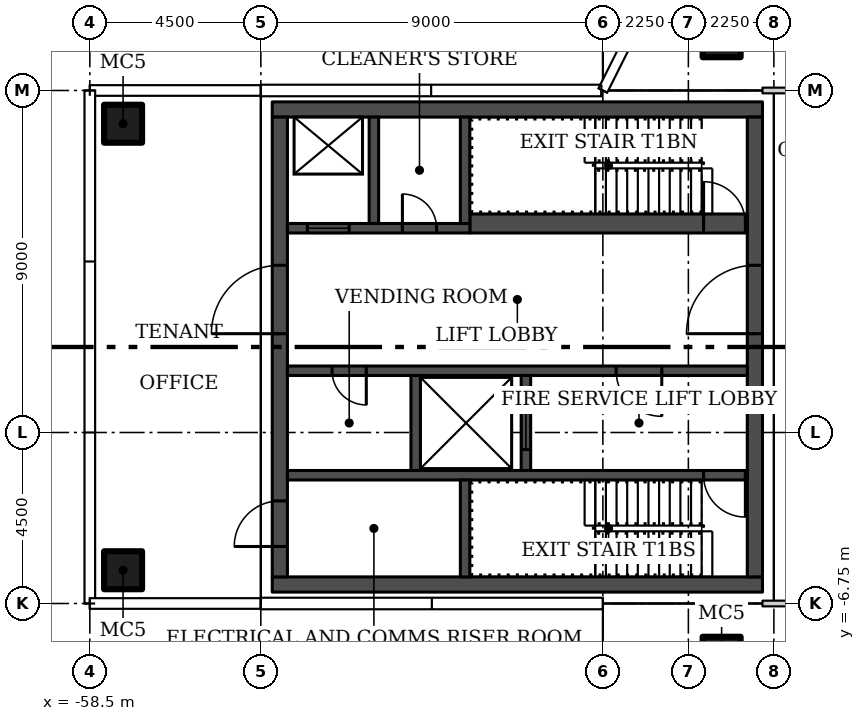
"""IFC4 building model, lengths in metres.
Left out: names, types, materials, properties, quantities, classifications, styles, units other than length and angle.
Written with IfcOpenShell. Run it as: python <this file> out.ifc"""

import sys

from ifc_helpers import new_model, si_unit, direction, frame, frame_2d, origin, origin_2d, place, context, subcontext, project, spatial, rectangle, hollow_rectangle, extrude, element, fill, save


model = new_model("IFC4")
c1 = context("Model", 3, precision=1e-05, world=origin(), true_north=direction((0.0, 1.0)))
c2 = subcontext(c1, "Body", "Model", "MODEL_VIEW")
j1 = project(units=[si_unit("LENGTHUNIT", "METRE"), si_unit("PLANEANGLEUNIT", "RADIAN")], contexts=[c1])
p1 = place(None, origin())
s1 = spatial("IfcSite", under=j1, at=p1, CompositionType="ELEMENT")
p2 = place(p1, origin())
s2 = spatial("IfcBuilding", under=s1, at=p2, CompositionType="ELEMENT")
p3 = place(p2, frame((0.0, 0.0, 217.8)))
s3 = spatial("IfcBuildingStorey", under=s2, at=p3, CompositionType="ELEMENT", Elevation=217.8)
for number, where in (
    (1, (-41.875, 8.125, 0.0)),
    (2, (-41.875, -8.125, 0.0)),
    (3, (-57.625, -5.875, 0.0)),
    (4, (-57.625, 5.875, 0.0)),
):
    element("IfcColumn", number, at=place(p3, frame(where)), inside=s3, PredefinedType="COLUMN", context=c2, shape_type="SweptSolid", body=[
        extrude(hollow_rectangle(XDim=1.0, YDim=1.0, WallThickness=0.04, at=origin_2d()), origin(), (0.0, 0.0, 1.0), 3.55),
    ])
p4 = place(p3, frame((-40.8, 6.75, 0.0)))
e5 = element("IfcWall", 5, at=p4, inside=s3, PredefinedType="PARTITIONING", context=c2, shape_type="SweptSolid", body=[
    extrude(rectangle(XDim=14.1, YDim=0.15, at=frame_2d((7.05, 0.0))), origin(), (0.0, 0.0, 1.0), 3.55),
])
p5 = place(p4, frame((6.3, 0.0, 0.0)))
e6 = element("IfcOpeningElement", 6, at=p5, cuts=e5, PredefinedType="OPENING", context=c2, shape_type="SweptSolid", body=[
    extrude(rectangle(XDim=1.5, YDim=2.1, at=frame_2d((0.75, 1.05))), frame((0.0, 0.085, 0.0), z_axis=(0.0, -1.0, 0.0), x_axis=(1.0, 0.0, 0.0)), (0.0, 0.0, 1.0), 0.17),
])
p6 = place(p3, frame((-26.7, -6.75, 0.0), z_axis=(0.0, 0.0, 1.0), x_axis=(-1.0, 0.0, 0.0)))
e7 = element("IfcWall", 7, at=p6, inside=s3, PredefinedType="PARTITIONING", context=c2, shape_type="SweptSolid", body=[
    extrude(rectangle(XDim=14.1, YDim=0.15, at=frame_2d((7.05, 0.0))), origin(), (0.0, 0.0, 1.0), 3.55),
])
p7 = place(p6, frame((6.3, 0.0, 0.0)))
e8 = element("IfcOpeningElement", 8, at=p7, cuts=e7, PredefinedType="OPENING", context=c2, shape_type="SweptSolid", body=[
    extrude(rectangle(XDim=1.5, YDim=2.1, at=frame_2d((0.75, 1.05))), frame((0.0, 0.085, 0.0), z_axis=(0.0, -1.0, 0.0), x_axis=(1.0, 0.0, 0.0)), (0.0, 0.0, 1.0), 0.17),
])
for number, where, z_axis, x_axis in (
    (9, (-40.8, -6.25, 0.0), (0.0, 0.0, 1.0), (-1.0, 0.0, 0.0)),
    (10, (-40.8, 6.25, 0.0), (0.0, 0.0, 1.0), (-1.0, 0.0, 0.0)),
):
    element("IfcWall", number, at=place(p3, frame(where, z_axis=z_axis, x_axis=x_axis)), inside=s3, PredefinedType="SHEAR", context=c2, shape_type="SweptSolid", body=[
        extrude(rectangle(XDim=12.9, YDim=0.4, at=frame_2d((6.45, 0.0))), origin(), (0.0, 0.0, 1.0), 3.55),
    ])
p8 = place(p3, frame((-41.0, -6.05, 0.0), z_axis=(0.0, 0.0, 1.0), x_axis=(0.0, 1.0, 0.0)))
e11 = element("IfcWall", 11, at=p8, inside=s3, PredefinedType="SHEAR", context=c2, shape_type="SweptSolid", body=[
    extrude(rectangle(XDim=12.1, YDim=0.4, at=frame_2d((6.05, 0.0))), origin(), (0.0, 0.0, 1.0), 3.55),
])
p9 = place(p8, frame((6.4, 0.0, 0.0)))
e12 = element("IfcOpeningElement", 12, at=p9, cuts=e11, PredefinedType="OPENING", context=c2, shape_type="SweptSolid", body=[
    extrude(rectangle(XDim=1.8, YDim=2.4, at=frame_2d((0.9, 1.2))), frame((0.0, 0.21, 0.0), z_axis=(0.0, -1.0, 0.0), x_axis=(1.0, 0.0, 0.0)), (0.0, 0.0, 1.0), 0.42),
])
p10 = place(p3, frame((-53.5, -6.05, 0.0), z_axis=(0.0, 0.0, 1.0), x_axis=(0.0, 1.0, 0.0)))
e13 = element("IfcWall", 13, at=p10, inside=s3, PredefinedType="SHEAR", context=c2, shape_type="SweptSolid", body=[
    extrude(rectangle(XDim=12.1, YDim=0.4, at=frame_2d((6.05, 0.0))), origin(), (0.0, 0.0, 1.0), 3.55),
])
p11 = place(p10, frame((0.8, 0.0, 0.0)))
e14 = element("IfcOpeningElement", 14, at=p11, cuts=e13, PredefinedType="OPENING", context=c2, shape_type="SweptSolid", body=[
    extrude(rectangle(XDim=1.2, YDim=2.1, at=frame_2d((0.6, 1.05))), frame((0.0, 0.21, 0.0), z_axis=(0.0, -1.0, 0.0), x_axis=(1.0, 0.0, 0.0)), (0.0, 0.0, 1.0), 0.42),
])
p12 = place(p10, frame((6.4, 0.0, 0.0)))
e15 = element("IfcOpeningElement", 15, at=p12, cuts=e13, PredefinedType="OPENING", context=c2, shape_type="SweptSolid", body=[
    extrude(rectangle(XDim=1.8, YDim=2.4, at=frame_2d((0.9, 1.2))), frame((0.0, 0.21, 0.0), z_axis=(0.0, -1.0, 0.0), x_axis=(1.0, 0.0, 0.0)), (0.0, 0.0, 1.0), 0.42),
])
p13 = place(p3, frame((-41.2, -3.375, 0.0), z_axis=(0.0, 0.0, 1.0), x_axis=(-1.0, 0.0, 0.0)))
e16 = element("IfcWall", 16, at=p13, inside=s3, PredefinedType="SHEAR", context=c2, shape_type="SweptSolid", body=[
    extrude(rectangle(XDim=12.1, YDim=0.25, at=frame_2d((6.05, 0.0))), origin(), (0.0, 0.0, 1.0), 3.55),
])
p14 = place(p13, frame((0.05, 0.0, 0.0)))
e17 = element("IfcOpeningElement", 17, at=p14, cuts=e16, PredefinedType="OPENING", context=c2, shape_type="SweptSolid", body=[
    extrude(rectangle(XDim=1.1, YDim=2.1, at=frame_2d((0.55, 1.05))), frame((0.0, 0.135, 0.0), z_axis=(0.0, -1.0, 0.0), x_axis=(1.0, 0.0, 0.0)), (0.0, 0.0, 1.0), 0.27),
])
p15 = place(p3, frame((-48.625, -6.05, 0.0), z_axis=(0.0, 0.0, 1.0), x_axis=(0.0, 1.0, 0.0)))
e18 = element("IfcWall", 18, at=p15, inside=s3, PredefinedType="SHEAR", context=c2, shape_type="SweptSolid", body=[
    extrude(rectangle(XDim=2.55, YDim=0.25, at=frame_2d((1.275, 0.0))), origin(), (0.0, 0.0, 1.0), 3.55),
])
p16 = place(p3, frame((-41.2, -0.625, 0.0), z_axis=(0.0, 0.0, 1.0), x_axis=(-1.0, 0.0, 0.0)))
e19 = element("IfcWall", 19, at=p16, inside=s3, PredefinedType="SHEAR", context=c2, shape_type="SweptSolid", body=[
    extrude(rectangle(XDim=12.1, YDim=0.25, at=frame_2d((6.05, 0.0))), origin(), (0.0, 0.0, 1.0), 3.55),
])
p17 = place(p16, frame((2.25, 0.0, 0.0)))
e20 = element("IfcOpeningElement", 20, at=p17, cuts=e19, PredefinedType="OPENING", context=c2, shape_type="SweptSolid", body=[
    extrude(rectangle(XDim=1.2, YDim=2.1, at=frame_2d((0.6, 1.05))), frame((0.0, 0.135, 0.0), z_axis=(0.0, -1.0, 0.0), x_axis=(1.0, 0.0, 0.0)), (0.0, 0.0, 1.0), 0.27),
])
p18 = place(p16, frame((10.025, 0.0, 0.0)))
e21 = element("IfcOpeningElement", 21, at=p18, cuts=e19, PredefinedType="OPENING", context=c2, shape_type="SweptSolid", body=[
    extrude(rectangle(XDim=0.9, YDim=2.1, at=frame_2d((0.45, 1.05))), frame((0.0, 0.135, 0.0), z_axis=(0.0, -1.0, 0.0), x_axis=(1.0, 0.0, 0.0)), (0.0, 0.0, 1.0), 0.27),
])
p19 = place(p3, frame((-47.025, -3.25, 0.0), z_axis=(0.0, 0.0, 1.0), x_axis=(0.0, 1.0, 0.0)))
e22 = element("IfcWall", 22, at=p19, inside=s3, PredefinedType="SHEAR", context=c2, shape_type="SweptSolid", body=[
    extrude(rectangle(XDim=2.5, YDim=0.25, at=frame_2d((1.25, 0.0))), origin(), (0.0, 0.0, 1.0), 3.55),
])
p20 = place(p19, frame((0.55, 0.0, 0.0)))
e23 = element("IfcOpeningElement", 23, at=p20, cuts=e22, PredefinedType="OPENING", context=c2, shape_type="SweptSolid", body=[
    extrude(rectangle(XDim=1.4, YDim=2.4, at=frame_2d((0.7, 1.2))), frame((0.0, 0.135, 0.0), z_axis=(0.0, -1.0, 0.0), x_axis=(1.0, 0.0, 0.0)), (0.0, 0.0, 1.0), 0.27),
])
p21 = place(p3, frame((-49.925, -3.25, 0.0), z_axis=(0.0, 0.0, 1.0), x_axis=(0.0, 1.0, 0.0)))
e24 = element("IfcWall", 24, at=p21, inside=s3, PredefinedType="SHEAR", context=c2, shape_type="SweptSolid", body=[
    extrude(rectangle(XDim=2.5, YDim=0.25, at=frame_2d((1.25, 0.0))), origin(), (0.0, 0.0, 1.0), 3.55),
])
p22 = place(p3, frame((-48.5, 3.25, 0.0)))
e25 = element("IfcWall", 25, at=p22, inside=s3, PredefinedType="SHEAR", context=c2, shape_type="SweptSolid", body=[
    extrude(rectangle(XDim=7.3, YDim=0.5, at=frame_2d((3.65, 0.0))), origin(), (0.0, 0.0, 1.0), 3.55),
])
p23 = place(p22, frame((6.15, 0.0, 0.0)))
e26 = element("IfcOpeningElement", 26, at=p23, cuts=e25, PredefinedType="OPENING", context=c2, shape_type="SweptSolid", body=[
    extrude(rectangle(XDim=1.1, YDim=2.1, at=frame_2d((0.55, 1.05))), frame((0.0, 0.26, 0.0), z_axis=(0.0, -1.0, 0.0), x_axis=(1.0, 0.0, 0.0)), (0.0, 0.0, 1.0), 0.52),
])
p24 = place(p3, frame((-53.3, 3.125, 0.0)))
e27 = element("IfcWall", 27, at=p24, inside=s3, PredefinedType="SHEAR", context=c2, shape_type="SweptSolid", body=[
    extrude(rectangle(XDim=4.8, YDim=0.25, at=frame_2d((2.4, 0.0))), origin(), (0.0, 0.0, 1.0), 3.55),
])
p25 = place(p24, frame((0.525, 0.0, 0.0)))
e28 = element("IfcOpeningElement", 28, at=p25, cuts=e27, PredefinedType="OPENING", context=c2, shape_type="SweptSolid", body=[
    extrude(rectangle(XDim=1.1, YDim=2.1, at=frame_2d((0.55, 1.05))), frame((0.0, 0.135, 0.0), z_axis=(0.0, -1.0, 0.0), x_axis=(1.0, 0.0, 0.0)), (0.0, 0.0, 1.0), 0.27),
])
p26 = place(p24, frame((3.025, 0.0, 0.0)))
e29 = element("IfcOpeningElement", 29, at=p26, cuts=e27, PredefinedType="OPENING", context=c2, shape_type="SweptSolid", body=[
    extrude(rectangle(XDim=0.9, YDim=2.1, at=frame_2d((0.45, 1.05))), frame((0.0, 0.135, 0.0), z_axis=(0.0, -1.0, 0.0), x_axis=(1.0, 0.0, 0.0)), (0.0, 0.0, 1.0), 0.27),
])
for number, where, z_axis, x_axis in (
    (30, (-48.625, 3.25, 0.0), (0.0, 0.0, 1.0), (0.0, 1.0, 0.0)),
    (31, (-51.025, 3.25, 0.0), (0.0, 0.0, 1.0), (0.0, 1.0, 0.0)),
):
    element("IfcWall", number, at=place(p3, frame(where, z_axis=z_axis, x_axis=x_axis)), inside=s3, PredefinedType="SHEAR", context=c2, shape_type="SweptSolid", body=[
        extrude(rectangle(XDim=2.8, YDim=0.25, at=frame_2d((1.4, 0.0))), origin(), (0.0, 0.0, 1.0), 3.55),
    ])
p27 = place(p9, origin())
e32 = element("IfcDoor", 32, at=p27, inside=s3, OperationType="DOUBLE_DOOR_SINGLE_SWING", PredefinedType="DOOR", context=c2, shape_type="SweptSolid", body=[
    extrude(rectangle(XDim=1.8, YDim=2.4, at=frame_2d((0.9, 1.2))), frame((0.0, 0.025, 0.0), z_axis=(0.0, -1.0, 0.0), x_axis=(1.0, 0.0, 0.0)), (0.0, 0.0, 1.0), 0.05),
])
fill(e12, e32)
p28 = place(p11, origin())
e33 = element("IfcDoor", 33, at=p28, inside=s3, OperationType="SINGLE_SWING_LEFT", PredefinedType="DOOR", context=c2, shape_type="SweptSolid", body=[
    extrude(rectangle(XDim=1.2, YDim=2.1, at=frame_2d((0.6, 1.05))), frame((0.0, 0.025, 0.0), z_axis=(0.0, -1.0, 0.0), x_axis=(1.0, 0.0, 0.0)), (0.0, 0.0, 1.0), 0.05),
])
fill(e14, e33)
p29 = place(p12, origin())
e34 = element("IfcDoor", 34, at=p29, inside=s3, OperationType="DOUBLE_DOOR_SINGLE_SWING", PredefinedType="DOOR", context=c2, shape_type="SweptSolid", body=[
    extrude(rectangle(XDim=1.8, YDim=2.4, at=frame_2d((0.9, 1.2))), frame((0.0, 0.025, 0.0), z_axis=(0.0, -1.0, 0.0), x_axis=(1.0, 0.0, 0.0)), (0.0, 0.0, 1.0), 0.05),
])
fill(e15, e34)
p30 = place(p14, origin())
e35 = element("IfcDoor", 35, at=p30, inside=s3, OperationType="SINGLE_SWING_LEFT", PredefinedType="DOOR", context=c2, shape_type="SweptSolid", body=[
    extrude(rectangle(XDim=1.1, YDim=2.1, at=frame_2d((0.55, 1.05))), frame((0.0, 0.025, 0.0), z_axis=(0.0, -1.0, 0.0), x_axis=(1.0, 0.0, 0.0)), (0.0, 0.0, 1.0), 0.05),
])
fill(e17, e35)
p31 = place(p17, origin())
e36 = element("IfcDoor", 36, at=p31, inside=s3, OperationType="SINGLE_SWING_LEFT", PredefinedType="DOOR", context=c2, shape_type="SweptSolid", body=[
    extrude(rectangle(XDim=1.2, YDim=2.1, at=frame_2d((0.6, 1.05))), frame((0.0, 0.025, 0.0), z_axis=(0.0, -1.0, 0.0), x_axis=(1.0, 0.0, 0.0)), (0.0, 0.0, 1.0), 0.05),
])
fill(e20, e36)
p32 = place(p18, origin())
e37 = element("IfcDoor", 37, at=p32, inside=s3, OperationType="SINGLE_SWING_RIGHT", PredefinedType="DOOR", context=c2, shape_type="SweptSolid", body=[
    extrude(rectangle(XDim=0.9, YDim=2.1, at=frame_2d((0.45, 1.05))), frame((0.0, 0.025, 0.0), z_axis=(0.0, -1.0, 0.0), x_axis=(1.0, 0.0, 0.0)), (0.0, 0.0, 1.0), 0.05),
])
fill(e21, e37)
p33 = place(p20, origin())
e38 = element("IfcDoor", 38, at=p33, inside=s3, OperationType="SLIDING_TO_LEFT", PredefinedType="DOOR", context=c2, shape_type="SweptSolid", body=[
    extrude(rectangle(XDim=1.4, YDim=2.4, at=frame_2d((0.7, 1.2))), frame((0.0, 0.025, 0.0), z_axis=(0.0, -1.0, 0.0), x_axis=(1.0, 0.0, 0.0)), (0.0, 0.0, 1.0), 0.05),
])
fill(e23, e38)
p34 = place(p23, origin())
e39 = element("IfcDoor", 39, at=p34, inside=s3, OperationType="SINGLE_SWING_RIGHT", PredefinedType="DOOR", context=c2, shape_type="SweptSolid", body=[
    extrude(rectangle(XDim=1.1, YDim=2.1, at=frame_2d((0.55, 1.05))), frame((0.0, 0.025, 0.0), z_axis=(0.0, -1.0, 0.0), x_axis=(1.0, 0.0, 0.0)), (0.0, 0.0, 1.0), 0.05),
])
fill(e26, e39)
p35 = place(p25, origin())
e40 = element("IfcDoor", 40, at=p35, inside=s3, OperationType="SLIDING_TO_LEFT", PredefinedType="DOOR", context=c2, shape_type="SweptSolid", body=[
    extrude(rectangle(XDim=1.1, YDim=2.1, at=frame_2d((0.55, 1.05))), frame((0.0, 0.025, 0.0), z_axis=(0.0, -1.0, 0.0), x_axis=(1.0, 0.0, 0.0)), (0.0, 0.0, 1.0), 0.05),
])
fill(e28, e40)
p36 = place(p26, origin())
e41 = element("IfcDoor", 41, at=p36, inside=s3, OperationType="SINGLE_SWING_RIGHT", PredefinedType="DOOR", context=c2, shape_type="SweptSolid", body=[
    extrude(rectangle(XDim=0.9, YDim=2.1, at=frame_2d((0.45, 1.05))), frame((0.0, 0.025, 0.0), z_axis=(0.0, -1.0, 0.0), x_axis=(1.0, 0.0, 0.0)), (0.0, 0.0, 1.0), 0.05),
])
fill(e29, e41)
save(model, sys.argv[1])
